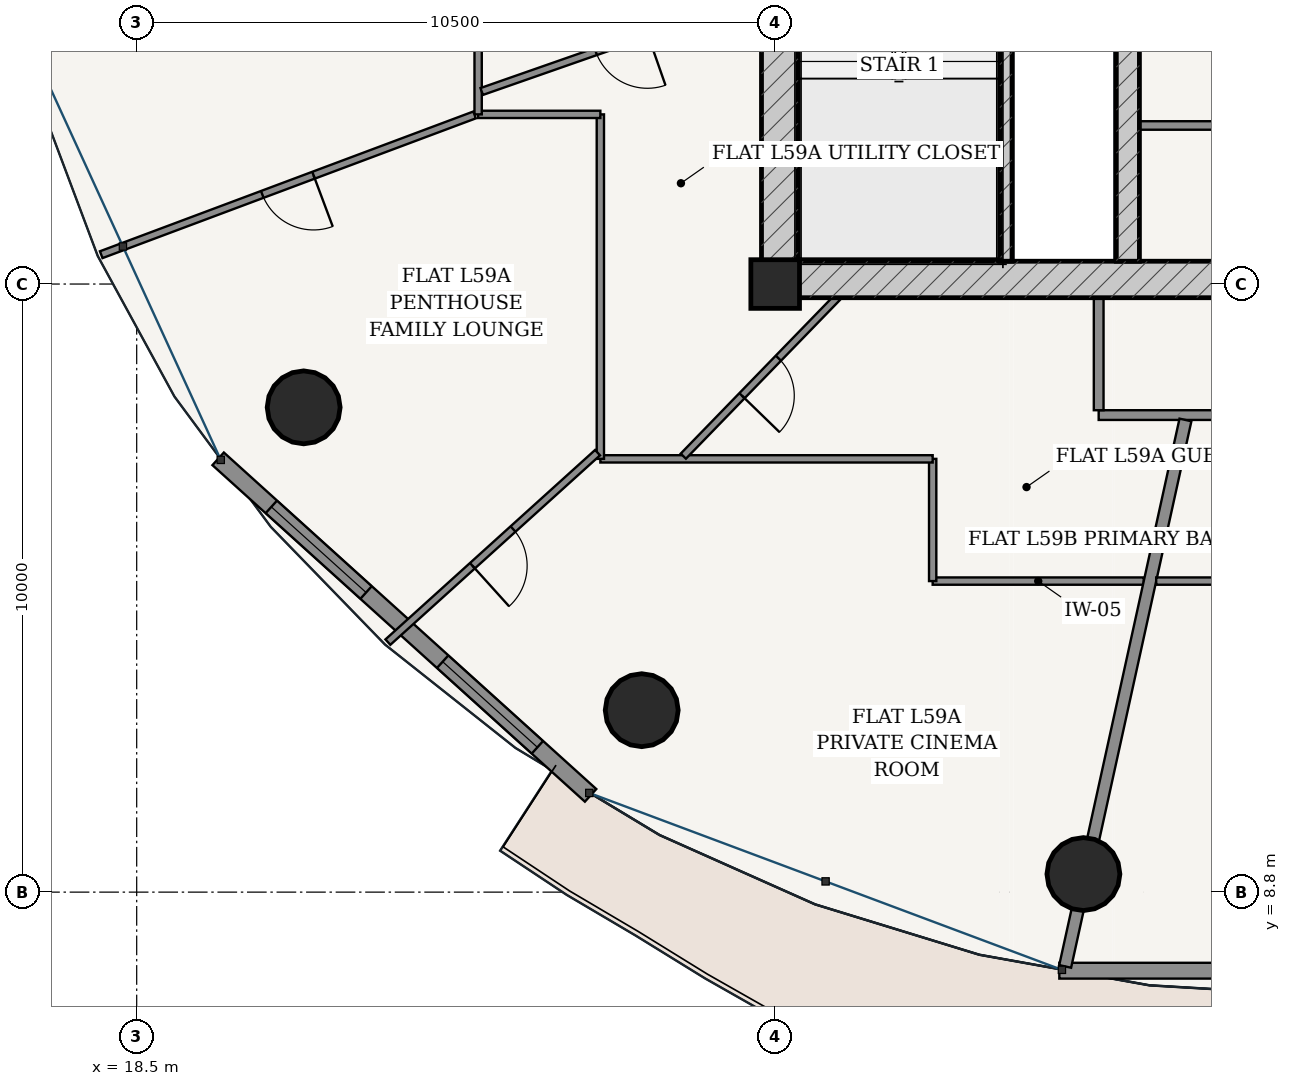
"""IFC4 building model, lengths in metres.
Left out: names, types, materials, properties, quantities, classifications, styles, units other than length and angle.
Written with IfcOpenShell. Run it as: python <this file> out.ifc"""

import sys

from ifc_helpers import new_model, si_unit, direction, frame, frame_2d, origin, origin_2d, place, context, subcontext, project, spatial, rectangle, hollow_circle, extrude, source, transform, mapped, element, fill, save


model = new_model("IFC4")
c1 = context("Model", 3, precision=1e-05, world=origin(), true_north=direction((-0.2419218956, 0.970295726276)))
c2 = subcontext(c1, "Body", "Model", "MODEL_VIEW")
j1 = project(units=[si_unit("LENGTHUNIT", "METRE"), si_unit("PLANEANGLEUNIT", "RADIAN")], contexts=[c1])
p1 = place(None, origin())
s1 = spatial("IfcSite", under=j1, at=p1, CompositionType="ELEMENT")
p2 = place(p1, origin())
s2 = spatial("IfcBuilding", under=s1, at=p2, CompositionType="ELEMENT")
p3 = place(p2, frame((0.0, 0.0, 224.5)))
s3 = spatial("IfcBuildingStorey", under=s2, at=p3, CompositionType="ELEMENT", Elevation=224.5)
p4 = place(p3, frame((29.0, 18.8, 0.0), z_axis=(0.0, 0.0, 1.0), x_axis=(1.0, 0.0, 0.0)))
e1 = element("IfcColumn", 1, at=p4, inside=s3, PredefinedType="COLUMN", context=c2, shape_type="SweptSolid", body=[
    extrude(rectangle(XDim=0.8, YDim=0.8, at=origin_2d()), origin(), (0.0, 0.0, 1.0), 3.7),
])
p5 = place(p3, frame((28.775, 18.875, 0.0), z_axis=(0.0, 0.0, 1.0), x_axis=(1.0, 0.0, 0.0)))
e2 = element("IfcWall", 2, at=p5, inside=s3, PredefinedType="SHEAR", context=c2, shape_type="SweptSolid", body=[
    extrude(rectangle(XDim=18.45, YDim=0.6, at=frame_2d((9.225, 0.0))), origin(), (0.0, 0.0, 1.0), 3.435),
])
p6 = place(p5, frame((8.8, 0.0, 0.0)))
e3 = element("IfcOpeningElement", 3, at=p6, cuts=e2, PredefinedType="OPENING", context=c2, shape_type="SweptSolid", body=[
    extrude(rectangle(XDim=0.85, YDim=2.1, at=frame_2d((0.425, 1.05))), frame((0.0, 0.31, 0.0), z_axis=(0.0, -1.0, 0.0), x_axis=(1.0, 0.0, 0.0)), (0.0, 0.0, 1.0), 0.62),
])
p7 = place(p3, frame((29.075, 19.175, 0.0), z_axis=(0.0, 0.0, 1.0), x_axis=(0.0, 1.0, 0.0)))
e4 = element("IfcWall", 4, at=p7, inside=s3, PredefinedType="SHEAR", context=c2, shape_type="SweptSolid", body=[
    extrude(rectangle(XDim=15.25, YDim=0.6, at=frame_2d((7.625, 0.0))), origin(), (0.0, 0.0, 1.0), 3.435),
])
p8 = place(p7, frame((9.875, 0.0, 0.0)))
e5 = element("IfcOpeningElement", 5, at=p8, cuts=e4, PredefinedType="OPENING", context=c2, shape_type="SweptSolid", body=[
    extrude(rectangle(XDim=1.5, YDim=2.2, at=frame_2d((0.75, 1.1))), frame((0.0, 0.31, 0.0), z_axis=(0.0, -1.0, 0.0), x_axis=(1.0, 0.0, 0.0)), (0.0, 0.0, 1.0), 0.62),
])
p9 = place(p3, frame((32.795, 19.175, 0.0), z_axis=(0.0, 0.0, 1.0), x_axis=(0.0, 1.0, 0.0)))
e6 = element("IfcWall", 6, at=p9, inside=s3, PredefinedType="SOLIDWALL", context=c2, shape_type="SweptSolid", body=[
    extrude(rectangle(XDim=7.375, YDim=0.2, at=frame_2d((3.688, 0.0))), origin(), (0.0, 0.0, 1.0), 3.435),
])
p10 = place(p3, frame((34.8, 19.175, 0.0), z_axis=(0.0, 0.0, 1.0), x_axis=(0.0, 1.0, 0.0)))
e7 = element("IfcWall", 7, at=p10, inside=s3, PredefinedType="SHEAR", context=c2, shape_type="SweptSolid", body=[
    extrude(rectangle(XDim=15.25, YDim=0.38, at=frame_2d((7.625, 0.0))), origin(), (0.0, 0.0, 1.0), 3.435),
])
p11 = place(p10, frame((7.8, 0.0, 0.0)))
e8 = element("IfcOpeningElement", 8, at=p11, cuts=e7, PredefinedType="OPENING", context=c2, shape_type="SweptSolid", body=[
    extrude(rectangle(XDim=1.05, YDim=2.15, at=frame_2d((0.525, 1.075))), frame((0.0, 0.2, 0.0), z_axis=(0.0, -1.0, 0.0), x_axis=(1.0, 0.0, 0.0)), (0.0, 0.0, 1.0), 0.4),
])
for number, where, z_axis, x_axis in (
    (9, (21.246, 16.772, 0.0), (0.0, 0.0, 1.0), (1.0, 0.0, 0.0)),
    (10, (26.805, 11.792, 0.0), (0.0, 0.0, 1.0), (1.0, 0.0, 0.0)),
    (11, (34.069, 9.097, 0.0), (0.0, 0.0, 1.0), (1.0, 0.0, 0.0)),
):
    element("IfcColumn", number, at=place(p3, frame(where, z_axis=z_axis, x_axis=x_axis)), inside=s3, PredefinedType="COLUMN", context=c2, shape_type="SweptSolid", body=[
        extrude(hollow_circle(Radius=0.6, WallThickness=0.038, at=origin_2d()), origin(), (0.0, 0.0, 1.0), 3.7),
    ])
p12 = place(p3, frame((19.84, 15.926, 0.0), z_axis=(0.0, 0.0, 1.0), x_axis=(0.741986838603, -0.670414447443, 0.0)))
e12 = element("IfcWall", 12, at=p12, inside=s3, PredefinedType="SOLIDWALL", context=c2, shape_type="SweptSolid", body=[
    extrude(rectangle(XDim=8.255, YDim=0.28, at=frame_2d((4.127, 0.0))), origin(), (0.0, 0.0, 1.0), 3.435),
])
p13 = place(p12, frame((1.179, 0.0, 0.85)))
e13 = element("IfcOpeningElement", 13, at=p13, cuts=e12, PredefinedType="OPENING", context=c2, shape_type="SweptSolid", body=[
    extrude(rectangle(XDim=2.1, YDim=1.95, at=frame_2d((1.05, 0.975))), frame((0.0, 0.15, 0.0), z_axis=(0.0, -1.0, 0.0), x_axis=(1.0, 0.0, 0.0)), (0.0, 0.0, 1.0), 0.3),
])
p14 = place(p12, frame((4.976, 0.0, 0.85)))
e14 = element("IfcOpeningElement", 14, at=p14, cuts=e12, PredefinedType="OPENING", context=c2, shape_type="SweptSolid", body=[
    extrude(rectangle(XDim=2.1, YDim=1.95, at=frame_2d((1.05, 0.975))), frame((0.0, 0.15, 0.0), z_axis=(0.0, -1.0, 0.0), x_axis=(1.0, 0.0, 0.0)), (0.0, 0.0, 1.0), 0.3),
])
p15 = place(p3, frame((33.673, 7.508, 0.0), z_axis=(0.0, 0.0, 1.0), x_axis=(1.0, 0.0, 0.0)))
e15 = element("IfcWall", 15, at=p15, inside=s3, PredefinedType="SOLIDWALL", context=c2, shape_type="SweptSolid", body=[
    extrude(rectangle(XDim=8.654, YDim=0.26, at=frame_2d((4.327, 0.0))), origin(), (0.0, 0.0, 1.0), 3.435),
])
p16 = place(p15, frame((3.652, 0.0, 0.0)))
e16 = element("IfcOpeningElement", 16, at=p16, cuts=e15, PredefinedType="OPENING", context=c2, shape_type="SweptSolid", body=[
    extrude(rectangle(XDim=1.35, YDim=2.2, at=frame_2d((0.675, 1.1))), frame((0.0, 0.14, 0.0), z_axis=(0.0, -1.0, 0.0), x_axis=(1.0, 0.0, 0.0)), (0.0, 0.0, 1.0), 0.28),
])
p17 = place(p3, frame((34.99, 21.407, 0.0), z_axis=(0.0, 0.0, 1.0), x_axis=(1.0, 0.0, 0.0)))
e17 = element("IfcWall", 17, at=p17, inside=s3, PredefinedType="PARTITIONING", context=c2, shape_type="SweptSolid", body=[
    extrude(rectangle(XDim=6.02, YDim=0.14, at=frame_2d((3.01, 0.0))), origin(), (0.0, 0.0, 1.0), 3.435),
])
p18 = place(p17, frame((2.585, 0.0, 0.0)))
e18 = element("IfcOpeningElement", 18, at=p18, cuts=e17, PredefinedType="OPENING", context=c2, shape_type="SweptSolid", body=[
    extrude(rectangle(XDim=0.85, YDim=2.1, at=frame_2d((0.425, 1.05))), frame((0.0, 0.08, 0.0), z_axis=(0.0, -1.0, 0.0), x_axis=(1.0, 0.0, 0.0)), (0.0, 0.0, 1.0), 0.16),
])
p19 = place(p3, frame((34.32, 16.645, 0.0), z_axis=(0.0, 0.0, 1.0), x_axis=(1.0, 0.0, 0.0)))
e19 = element("IfcWall", 19, at=p19, inside=s3, PredefinedType="PARTITIONING", context=c2, shape_type="SweptSolid", body=[
    extrude(rectangle(XDim=14.835, YDim=0.16, at=frame_2d((7.417, 0.0))), origin(), (0.0, 0.0, 1.0), 2.951),
])
p20 = place(p19, frame((10.135, 0.0, 0.0)))
e20 = element("IfcOpeningElement", 20, at=p20, cuts=e19, PredefinedType="OPENING", context=c2, shape_type="SweptSolid", body=[
    extrude(rectangle(XDim=0.98, YDim=2.2, at=frame_2d((0.49, 1.1))), frame((0.0, 0.09, 0.0), z_axis=(0.0, -1.0, 0.0), x_axis=(1.0, 0.0, 0.0)), (0.0, 0.0, 1.0), 0.18),
])
p21 = place(p3, frame((34.32, 16.725, 0.0), z_axis=(0.0, 0.0, 1.0), x_axis=(0.0, 1.0, 0.0)))
e21 = element("IfcWall", 21, at=p21, inside=s3, PredefinedType="PARTITIONING", context=c2, shape_type="SweptSolid", body=[
    extrude(rectangle(XDim=1.85, YDim=0.16, at=frame_2d((0.925, 0.0))), origin(), (0.0, 0.0, 1.0), 3.435),
])
p22 = place(p3, frame((35.062, 13.915, 0.0), z_axis=(0.0, 0.0, 1.0), x_axis=(-1.0, 0.0, 0.0)))
e22 = element("IfcWall", 22, at=p22, inside=s3, PredefinedType="PARTITIONING", context=c2, shape_type="SweptSolid", body=[
    extrude(rectangle(XDim=3.472, YDim=0.12, at=frame_2d((1.736, 0.0))), origin(), (0.0, 0.0, 1.0), 2.951),
])
p23 = place(p3, frame((31.59, 13.915, 0.0), z_axis=(0.0, 0.0, 1.0), x_axis=(0.0, 1.0, 0.0)))
e23 = element("IfcWall", 23, at=p23, inside=s3, PredefinedType="PARTITIONING", context=c2, shape_type="SweptSolid", body=[
    extrude(rectangle(XDim=2.01, YDim=0.12, at=frame_2d((1.005, 0.0))), origin(), (0.0, 0.0, 1.0), 3.11),
])
p24 = place(p3, frame((31.59, 15.925, 0.0), z_axis=(0.0, 0.0, 1.0), x_axis=(-1.0, 0.0, 0.0)))
e24 = element("IfcWall", 24, at=p24, inside=s3, PredefinedType="PARTITIONING", context=c2, shape_type="SweptSolid", body=[
    extrude(rectangle(XDim=5.465, YDim=0.12, at=frame_2d((2.732, 0.0))), origin(), (0.0, 0.0, 1.0), 2.951),
])
p25 = place(p3, frame((26.125, 15.925, 0.0), z_axis=(0.0, 0.0, 1.0), x_axis=(0.0, 1.0, 0.0)))
e25 = element("IfcWall", 25, at=p25, inside=s3, PredefinedType="PARTITIONING", context=c2, shape_type="SweptSolid", body=[
    extrude(rectangle(XDim=5.665, YDim=0.12, at=frame_2d((2.833, 0.0))), origin(), (0.0, 0.0, 1.0), 2.951),
])
p26 = place(p3, frame((26.125, 21.59, 0.0), z_axis=(0.0, 0.0, 1.0), x_axis=(-1.0, 0.0, 0.0)))
e26 = element("IfcWall", 26, at=p26, inside=s3, PredefinedType="PARTITIONING", context=c2, shape_type="SweptSolid", body=[
    extrude(rectangle(XDim=2.01, YDim=0.12, at=frame_2d((1.005, 0.0))), origin(), (0.0, 0.0, 1.0), 3.11),
])
p27 = place(p3, frame((24.115, 21.59, 0.0), z_axis=(0.0, 0.0, 1.0), x_axis=(0.0, 1.0, 0.0)))
e27 = element("IfcWall", 27, at=p27, inside=s3, PredefinedType="PARTITIONING", context=c2, shape_type="SweptSolid", body=[
    extrude(rectangle(XDim=16.245, YDim=0.12, at=frame_2d((8.123, 0.0))), origin(), (0.0, 0.0, 1.0), 2.951),
])
p28 = place(p27, frame((10.733, 0.0, 0.0)))
e28 = element("IfcOpeningElement", 28, at=p28, cuts=e27, PredefinedType="OPENING", context=c2, shape_type="SweptSolid", body=[
    extrude(rectangle(XDim=0.9, YDim=2.15, at=frame_2d((0.45, 1.075))), frame((0.0, 0.07, 0.0), z_axis=(0.0, -1.0, 0.0), x_axis=(1.0, 0.0, 0.0)), (0.0, 0.0, 1.0), 0.14),
])
p29 = place(p3, frame((24.057, 21.581, 0.0), z_axis=(0.0, 0.0, 1.0), x_axis=(-0.936527968377, -0.350592875637, 0.0)))
e29 = element("IfcWall", 29, at=p29, inside=s3, PredefinedType="PARTITIONING", context=c2, shape_type="SweptSolid", body=[
    extrude(rectangle(XDim=6.556, YDim=0.12, at=frame_2d((3.278, 0.0))), origin(), (0.0, 0.0, 1.0), 2.951),
])
p30 = place(p29, frame((2.828, 0.0, 0.0)))
e30 = element("IfcOpeningElement", 30, at=p30, cuts=e29, PredefinedType="OPENING", context=c2, shape_type="SweptSolid", body=[
    extrude(rectangle(XDim=0.9, YDim=2.15, at=frame_2d((0.45, 1.075))), frame((0.0, 0.07, 0.0), z_axis=(0.0, -1.0, 0.0), x_axis=(1.0, 0.0, 0.0)), (0.0, 0.0, 1.0), 0.14),
])
p31 = place(p3, frame((26.079, 16.027, 0.0), z_axis=(0.0, 0.0, 1.0), x_axis=(-0.741950057395, -0.67045515311, 0.0)))
e31 = element("IfcWall", 31, at=p31, inside=s3, PredefinedType="PARTITIONING", context=c2, shape_type="SweptSolid", body=[
    extrude(rectangle(XDim=4.647, YDim=0.12, at=frame_2d((2.324, 0.0))), origin(), (0.0, 0.0, 1.0), 2.951),
])
p32 = place(p31, frame((1.874, 0.0, 0.0)))
e32 = element("IfcOpeningElement", 32, at=p32, cuts=e31, PredefinedType="OPENING", context=c2, shape_type="SweptSolid", body=[
    extrude(rectangle(XDim=0.9, YDim=2.15, at=frame_2d((0.45, 1.075))), frame((0.0, 0.07, 0.0), z_axis=(0.0, -1.0, 0.0), x_axis=(1.0, 0.0, 0.0)), (0.0, 0.0, 1.0), 0.14),
])
p33 = place(p3, frame((28.775, 23.575, 0.0), z_axis=(0.0, 0.0, 1.0), x_axis=(-0.943974645063, -0.330017983569, 0.0)))
e33 = element("IfcWall", 33, at=p33, inside=s3, PredefinedType="PARTITIONING", context=c2, shape_type="SweptSolid", body=[
    extrude(rectangle(XDim=4.875, YDim=0.12, at=frame_2d((2.437, 0.0))), origin(), (0.0, 0.0, 1.0), 3.11),
])
p34 = place(p33, frame((1.987, 0.0, 0.0)))
e34 = element("IfcOpeningElement", 34, at=p34, cuts=e33, PredefinedType="OPENING", context=c2, shape_type="SweptSolid", body=[
    extrude(rectangle(XDim=0.9, YDim=2.15, at=frame_2d((0.45, 1.075))), frame((0.0, 0.07, 0.0), z_axis=(0.0, -1.0, 0.0), x_axis=(1.0, 0.0, 0.0)), (0.0, 0.0, 1.0), 0.14),
])
p35 = place(p3, frame((30.018, 18.575, 0.0), z_axis=(0.0, 0.0, 1.0), x_axis=(-0.696436677683, -0.717618250867, 0.0)))
e35 = element("IfcWall", 35, at=p35, inside=s3, PredefinedType="PARTITIONING", context=c2, shape_type="SweptSolid", body=[
    extrude(rectangle(XDim=3.631, YDim=0.12, at=frame_2d((1.815, 0.0))), origin(), (0.0, 0.0, 1.0), 2.951),
])
p36 = place(p35, frame((1.385, 0.0, 0.0)))
e36 = element("IfcOpeningElement", 36, at=p36, cuts=e35, PredefinedType="OPENING", context=c2, shape_type="SweptSolid", body=[
    extrude(rectangle(XDim=0.86, YDim=2.15, at=frame_2d((0.43, 1.075))), frame((0.0, 0.07, 0.0), z_axis=(0.0, -1.0, 0.0), x_axis=(1.0, 0.0, 0.0)), (0.0, 0.0, 1.0), 0.14),
])
p37 = place(p3, frame((35.747, 16.565, 0.0), z_axis=(0.0, 0.0, 1.0), x_axis=(-0.214957946814, -0.976623305631, 0.0)))
e37 = element("IfcWall", 37, at=p37, inside=s3, PredefinedType="PARTITIONING", context=c2, shape_type="SweptSolid", body=[
    extrude(rectangle(XDim=9.202, YDim=0.2, at=frame_2d((4.601, 0.0))), origin(), (0.0, 0.0, 1.0), 2.951),
])
p38 = place(p3, frame((51.885, 13.915, 0.0), z_axis=(0.0, 0.0, 1.0), x_axis=(-1.0, 0.0, 0.0)))
e38 = element("IfcWall", 38, at=p38, inside=s3, PredefinedType="PARTITIONING", context=c2, shape_type="SweptSolid", body=[
    extrude(rectangle(XDim=16.619, YDim=0.12, at=frame_2d((8.31, 0.0))), origin(), (0.0, 0.0, 1.0), 2.951),
])
p39 = place(p38, frame((6.797, 0.0, 0.0)))
e39 = element("IfcOpeningElement", 39, at=p39, cuts=e38, PredefinedType="OPENING", context=c2, shape_type="SweptSolid", body=[
    extrude(rectangle(XDim=0.9, YDim=2.15, at=frame_2d((0.45, 1.075))), frame((0.0, 0.07, 0.0), z_axis=(0.0, -1.0, 0.0), x_axis=(1.0, 0.0, 0.0)), (0.0, 0.0, 1.0), 0.14),
])
p40 = place(p38, frame((1.849, 0.0, 0.0)))
e40 = element("IfcOpeningElement", 40, at=p40, cuts=e38, PredefinedType="OPENING", context=c2, shape_type="SweptSolid", body=[
    extrude(rectangle(XDim=0.9, YDim=2.15, at=frame_2d((0.45, 1.075))), frame((0.0, 0.07, 0.0), z_axis=(0.0, -1.0, 0.0), x_axis=(1.0, 0.0, 0.0)), (0.0, 0.0, 1.0), 0.14),
])
m1 = source(origin(), c2, "Body", "SweptSolid", [
    extrude(rectangle(XDim=2.1, YDim=1.95, at=frame_2d((1.05, 0.975))), frame((0.0, 0.03, 0.0), z_axis=(0.0, -1.0, 0.0), x_axis=(1.0, 0.0, 0.0)), (0.0, 0.0, 1.0), 0.06),
])
p41 = place(p13, origin())
e41 = element("IfcWindow", 41, at=p41, inside=s3, PartitioningType="SINGLE_PANEL", PredefinedType="WINDOW", context=c2, shape_type="MappedRepresentation", body=[
    mapped(m1, transform((0.0, 0.0, 0.0), scale=1.0)),
])
fill(e13, e41)
p42 = place(p14, origin())
e42 = element("IfcWindow", 42, at=p42, inside=s3, PartitioningType="SINGLE_PANEL", PredefinedType="WINDOW", context=c2, shape_type="MappedRepresentation", body=[
    mapped(m1, transform((0.0, 0.0, 0.0), scale=1.0)),
])
fill(e14, e42)
m2 = source(origin(), c2, "Body", "SweptSolid", [
    extrude(rectangle(XDim=0.9, YDim=2.15, at=frame_2d((0.45, 1.075))), frame((0.0, 0.025, 0.0), z_axis=(0.0, -1.0, 0.0), x_axis=(1.0, 0.0, 0.0)), (0.0, 0.0, 1.0), 0.05),
])
p43 = place(p34, origin())
e43 = element("IfcDoor", 43, at=p43, inside=s3, OperationType="SINGLE_SWING_LEFT", PredefinedType="DOOR", context=c2, shape_type="MappedRepresentation", body=[
    mapped(m2, transform((0.0, 0.0, 0.0), scale=1.0)),
])
fill(e34, e43)
m3 = source(origin(), c2, "Body", "SweptSolid", [
    extrude(rectangle(XDim=0.86, YDim=2.15, at=frame_2d((0.43, 1.075))), frame((0.0, 0.025, 0.0), z_axis=(0.0, -1.0, 0.0), x_axis=(1.0, 0.0, 0.0)), (0.0, 0.0, 1.0), 0.05),
])
p44 = place(p36, origin())
e44 = element("IfcDoor", 44, at=p44, inside=s3, OperationType="SINGLE_SWING_RIGHT", PredefinedType="DOOR", context=c2, shape_type="MappedRepresentation", body=[
    mapped(m3, transform((0.0, 0.0, 0.0), scale=1.0)),
])
fill(e36, e44)
p45 = place(p30, origin())
e45 = element("IfcDoor", 45, at=p45, inside=s3, OperationType="SINGLE_SWING_LEFT", PredefinedType="DOOR", context=c2, shape_type="MappedRepresentation", body=[
    mapped(m2, transform((0.0, 0.0, 0.0), scale=1.0)),
])
fill(e30, e45)
p46 = place(p32, origin())
e46 = element("IfcDoor", 46, at=p46, inside=s3, OperationType="SINGLE_SWING_RIGHT", PredefinedType="DOOR", context=c2, shape_type="MappedRepresentation", body=[
    mapped(m2, transform((0.0, 0.0, 0.0), scale=1.0)),
])
fill(e32, e46)
save(model, sys.argv[1])
